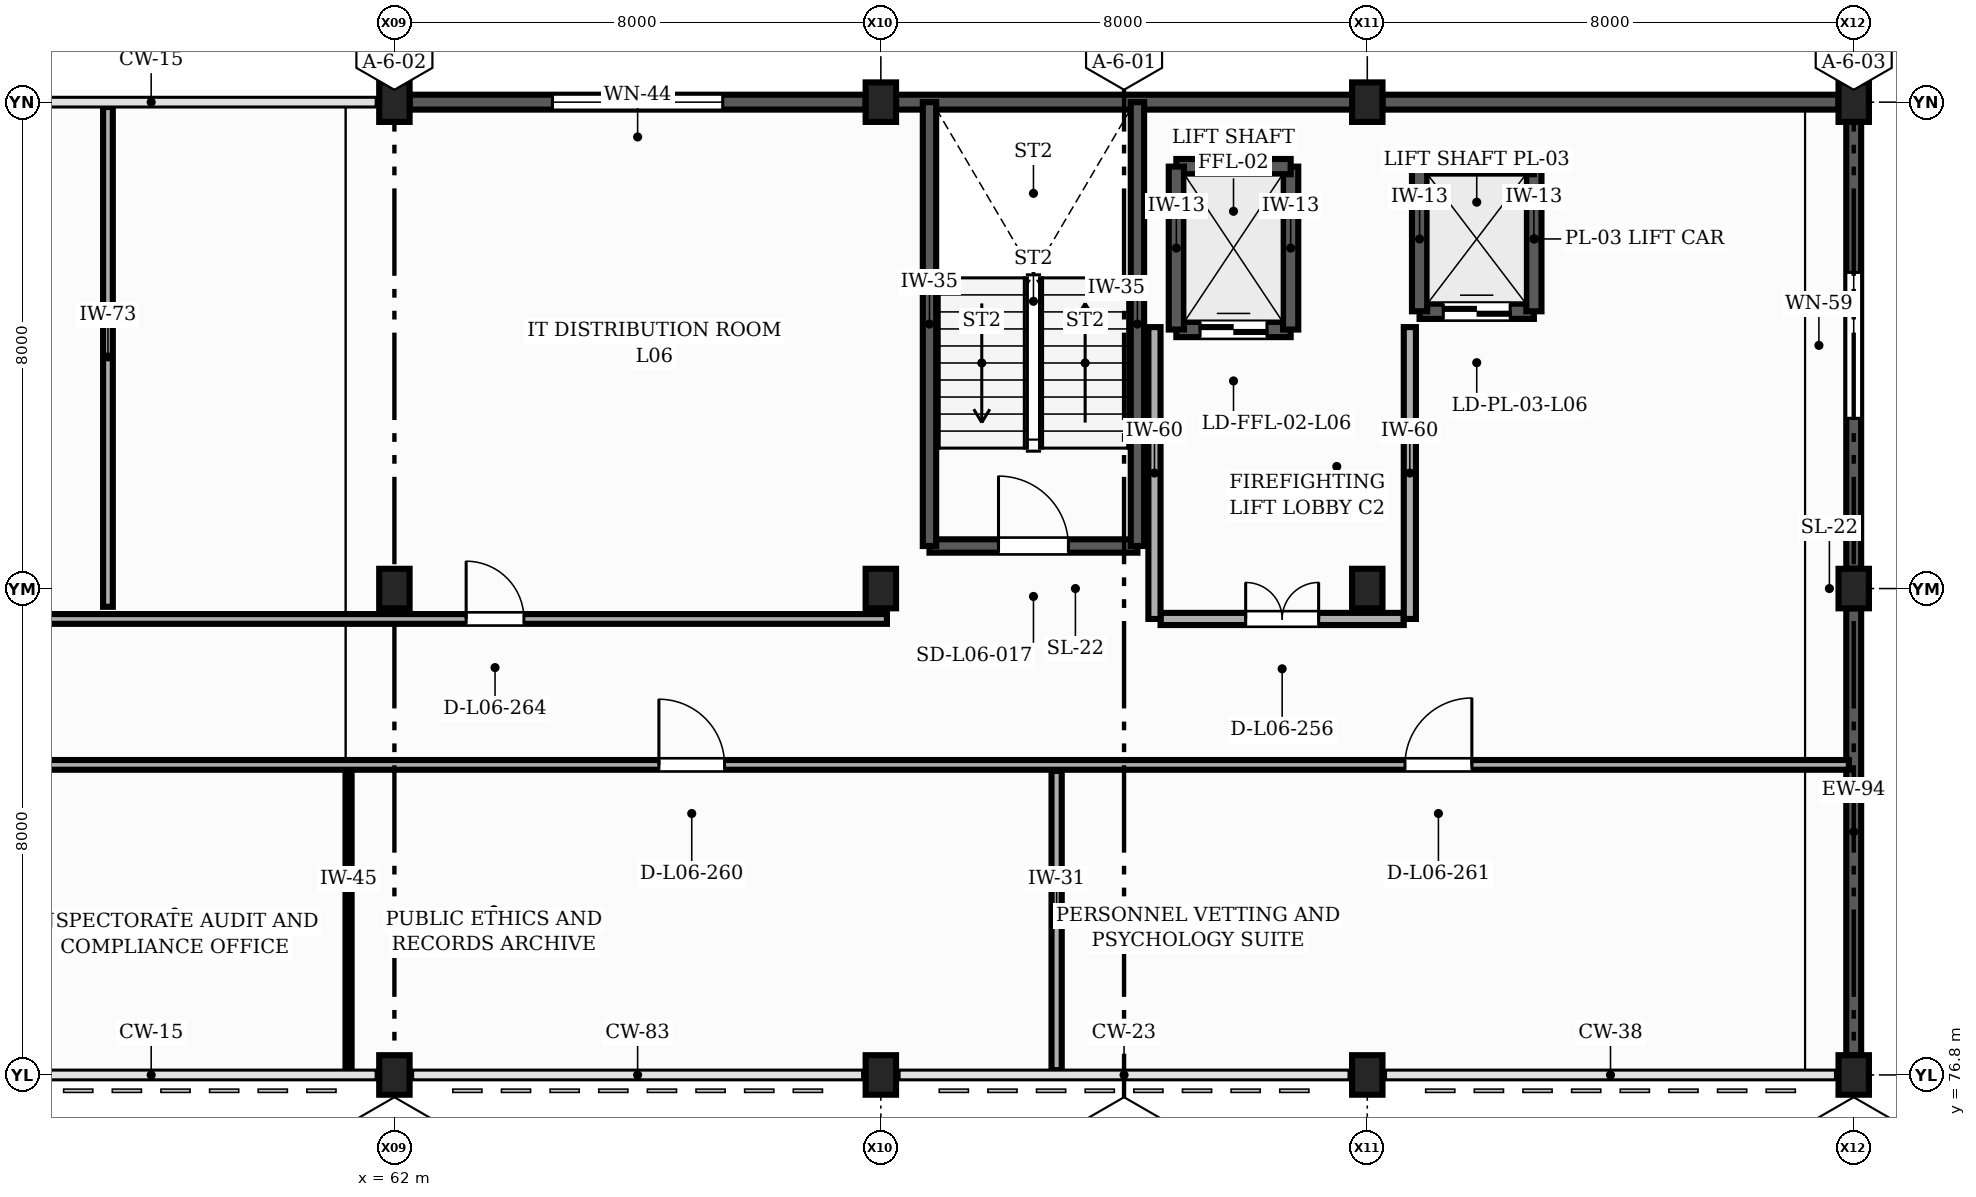
"""IFC4 building model, lengths in metres.
Left out: names, types, materials, properties, quantities, classifications, styles, units other than length and angle.
Written with IfcOpenShell. Run it as: python <this file> out.ifc"""

import sys

from ifc_helpers import new_model, si_unit, direction, frame, frame_2d, origin, origin_2d, place, context, subcontext, project, spatial, rectangle, extrude, element, fill, save


model = new_model("IFC4")
c1 = context("Model", 3, precision=1e-05, world=origin(), true_north=direction((0.0, 1.0)))
c2 = subcontext(c1, "Body", "Model", "MODEL_VIEW")
j1 = project(units=[si_unit("LENGTHUNIT", "METRE"), si_unit("PLANEANGLEUNIT", "RADIAN")], contexts=[c1])
p1 = place(None, origin())
s1 = spatial("IfcSite", under=j1, at=p1, CompositionType="ELEMENT")
p2 = place(p1, origin())
s2 = spatial("IfcBuilding", under=s1, at=p2, CompositionType="ELEMENT")
p3 = place(p2, frame((0.0, 0.0, 25.8)))
s3 = spatial("IfcBuildingStorey", under=s2, at=p3, CompositionType="ELEMENT", Elevation=25.8)
for number, where, z_axis, x_axis in (
    (1, (62.0, 76.8, 0.0), (0.0, 0.0, 1.0), (1.0, 0.0, 0.0)),
    (2, (62.0, 84.8, 0.0), (0.0, 0.0, 1.0), (1.0, 0.0, 0.0)),
    (3, (62.0, 92.8, 0.0), (0.0, 0.0, 1.0), (1.0, 0.0, 0.0)),
    (4, (70.0, 76.8, 0.0), (0.0, 0.0, 1.0), (1.0, 0.0, 0.0)),
    (5, (70.0, 84.8, 0.0), (0.0, 0.0, 1.0), (1.0, 0.0, 0.0)),
    (6, (70.0, 92.8, 0.0), (0.0, 0.0, 1.0), (1.0, 0.0, 0.0)),
    (7, (78.0, 76.8, 0.0), (0.0, 0.0, 1.0), (1.0, 0.0, 0.0)),
    (8, (78.0, 84.8, 0.0), (0.0, 0.0, 1.0), (1.0, 0.0, 0.0)),
    (9, (78.0, 92.8, 0.0), (0.0, 0.0, 1.0), (1.0, 0.0, 0.0)),
    (10, (86.0, 76.8, 0.0), (0.0, 0.0, 1.0), (1.0, 0.0, 0.0)),
    (11, (86.0, 84.8, 0.0), (0.0, 0.0, 1.0), (1.0, 0.0, 0.0)),
    (12, (86.0, 92.8, 0.0), (0.0, 0.0, 1.0), (1.0, 0.0, 0.0)),
):
    element("IfcColumn", number, at=place(p3, frame(where, z_axis=z_axis, x_axis=x_axis)), inside=s3, PredefinedType="COLUMN", context=c2, shape_type="SweptSolid", body=[
        extrude(rectangle(XDim=0.5, YDim=0.65, at=origin_2d()), origin(), (0.0, 0.0, 1.0), 3.9),
    ])
p4 = place(p3, frame((86.0, 77.125, 0.0), z_axis=(0.0, 0.0, 1.0), x_axis=(0.0, 1.0, 0.0)))
e13 = element("IfcWall", 13, at=p4, inside=s3, PredefinedType="SOLIDWALL", context=c2, shape_type="SweptSolid", body=[
    extrude(rectangle(XDim=7.35, YDim=0.245, at=frame_2d((3.675, 0.0))), origin(), (0.0, 0.0, 1.0), 3.01),
])
p5 = place(p3, frame((86.0, 85.125, 0.0), z_axis=(0.0, 0.0, 1.0), x_axis=(0.0, 1.0, 0.0)))
e14 = element("IfcWall", 14, at=p5, inside=s3, PredefinedType="SOLIDWALL", context=c2, shape_type="SweptSolid", body=[
    extrude(rectangle(XDim=7.35, YDim=0.245, at=frame_2d((3.675, 0.0))), origin(), (0.0, 0.0, 1.0), 3.01),
])
p6 = place(p5, frame((2.475, 0.0, 0.9)))
e15 = element("IfcOpeningElement", 15, at=p6, cuts=e14, PredefinedType="OPENING", context=c2, shape_type="SweptSolid", body=[
    extrude(rectangle(XDim=2.4, YDim=1.5, at=frame_2d((1.2, 0.75))), frame((0.0, 0.133, 0.0), z_axis=(0.0, -1.0, 0.0), x_axis=(1.0, 0.0, 0.0)), (0.0, 0.0, 1.0), 0.265),
])
p7 = place(p3, frame((85.75, 92.8, 0.0), z_axis=(0.0, 0.0, 1.0), x_axis=(-1.0, 0.0, 0.0)))
e16 = element("IfcWall", 16, at=p7, inside=s3, PredefinedType="SOLIDWALL", context=c2, shape_type="SweptSolid", body=[
    extrude(rectangle(XDim=7.5, YDim=0.245, at=frame_2d((3.75, 0.0))), origin(), (0.0, 0.0, 1.0), 3.01),
])
p8 = place(p3, frame((77.75, 92.8, 0.0), z_axis=(0.0, 0.0, 1.0), x_axis=(-1.0, 0.0, 0.0)))
e17 = element("IfcWall", 17, at=p8, inside=s3, PredefinedType="SOLIDWALL", context=c2, shape_type="SweptSolid", body=[
    extrude(rectangle(XDim=7.5, YDim=0.245, at=frame_2d((3.75, 0.0))), origin(), (0.0, 0.0, 1.0), 3.66),
])
p9 = place(p3, frame((69.75, 92.8, 0.0), z_axis=(0.0, 0.0, 1.0), x_axis=(-1.0, 0.0, 0.0)))
e18 = element("IfcWall", 18, at=p9, inside=s3, PredefinedType="SOLIDWALL", context=c2, shape_type="SweptSolid", body=[
    extrude(rectangle(XDim=7.5, YDim=0.245, at=frame_2d((3.75, 0.0))), origin(), (0.0, 0.0, 1.0), 3.01),
])
p10 = place(p9, frame((2.35, 0.0, 0.9)))
e19 = element("IfcOpeningElement", 19, at=p10, cuts=e18, PredefinedType="OPENING", context=c2, shape_type="SweptSolid", body=[
    extrude(rectangle(XDim=2.8, YDim=1.8, at=frame_2d((1.4, 0.9))), frame((0.0, 0.133, 0.0), z_axis=(0.0, -1.0, 0.0), x_axis=(1.0, 0.0, 0.0)), (0.0, 0.0, 1.0), 0.265),
])
p11 = place(p3, frame((70.8, 85.5, 0.0), z_axis=(0.0, 0.0, 1.0), x_axis=(1.0, 0.0, 0.0)))
e20 = element("IfcWall", 20, at=p11, inside=s3, PredefinedType="SHEAR", context=c2, shape_type="SweptSolid", body=[
    extrude(rectangle(XDim=3.42, YDim=0.22, at=frame_2d((1.71, 0.0))), origin(), (0.0, 0.0, 1.0), 3.9),
])
p12 = place(p11, frame((1.135, 0.0, 0.0)))
e21 = element("IfcOpeningElement", 21, at=p12, cuts=e20, PredefinedType="OPENING", context=c2, shape_type="SweptSolid", body=[
    extrude(rectangle(XDim=1.15, YDim=2.15, at=frame_2d((0.575, 1.075))), frame((0.0, 0.12, 0.0), z_axis=(0.0, -1.0, 0.0), x_axis=(1.0, 0.0, 0.0)), (0.0, 0.0, 1.0), 0.24),
])
for number, where, z_axis, x_axis in (
    (22, (74.22, 85.5, 0.0), (0.0, 0.0, 1.0), (0.0, 1.0, 0.0)),
    (23, (70.8, 92.8, 0.0), (0.0, 0.0, 1.0), (0.0, -1.0, 0.0)),
):
    element("IfcWall", number, at=place(p3, frame(where, z_axis=z_axis, x_axis=x_axis)), inside=s3, PredefinedType="SHEAR", context=c2, shape_type="SweptSolid", body=[
        extrude(rectangle(XDim=7.3, YDim=0.22, at=frame_2d((3.65, 0.0))), origin(), (0.0, 0.0, 1.0), 3.9),
    ])
p13 = place(p3, frame((74.86, 89.06, 0.0), z_axis=(0.0, 0.0, 1.0), x_axis=(1.0, 0.0, 0.0)))
e24 = element("IfcWall", 24, at=p13, inside=s3, PredefinedType="SHEAR", context=c2, shape_type="SweptSolid", body=[
    extrude(rectangle(XDim=1.88, YDim=0.25, at=frame_2d((0.94, 0.0))), origin(), (0.0, 0.0, 1.0), 3.9),
])
p14 = place(p13, frame((0.39, 0.0, 0.0)))
e25 = element("IfcOpeningElement", 25, at=p14, cuts=e24, PredefinedType="OPENING", context=c2, shape_type="SweptSolid", body=[
    extrude(rectangle(XDim=1.1, YDim=2.2, at=frame_2d((0.55, 1.1))), frame((0.0, 0.135, 0.0), z_axis=(0.0, -1.0, 0.0), x_axis=(1.0, 0.0, 0.0)), (0.0, 0.0, 1.0), 0.27),
])
p15 = place(p3, frame((76.74, 89.06, 0.0), z_axis=(0.0, 0.0, 1.0), x_axis=(0.0, 1.0, 0.0)))
e26 = element("IfcWall", 26, at=p15, inside=s3, PredefinedType="SHEAR", context=c2, shape_type="SweptSolid", body=[
    extrude(rectangle(XDim=2.68, YDim=0.25, at=frame_2d((1.34, 0.0))), origin(), (0.0, 0.0, 1.0), 3.9),
])
p16 = place(p3, frame((76.74, 91.74, 0.0), z_axis=(0.0, 0.0, 1.0), x_axis=(-1.0, 0.0, 0.0)))
e27 = element("IfcWall", 27, at=p16, inside=s3, PredefinedType="SHEAR", context=c2, shape_type="SweptSolid", body=[
    extrude(rectangle(XDim=1.88, YDim=0.25, at=frame_2d((0.94, 0.0))), origin(), (0.0, 0.0, 1.0), 3.9),
])
p17 = place(p3, frame((74.86, 91.74, 0.0), z_axis=(0.0, 0.0, 1.0), x_axis=(0.0, -1.0, 0.0)))
e28 = element("IfcWall", 28, at=p17, inside=s3, PredefinedType="SHEAR", context=c2, shape_type="SweptSolid", body=[
    extrude(rectangle(XDim=2.68, YDim=0.25, at=frame_2d((1.34, 0.0))), origin(), (0.0, 0.0, 1.0), 3.9),
])
p18 = place(p3, frame((78.86, 89.36, 0.0), z_axis=(0.0, 0.0, 1.0), x_axis=(1.0, 0.0, 0.0)))
e29 = element("IfcWall", 29, at=p18, inside=s3, PredefinedType="SHEAR", context=c2, shape_type="SweptSolid", body=[
    extrude(rectangle(XDim=1.88, YDim=0.25, at=frame_2d((0.94, 0.0))), origin(), (0.0, 0.0, 1.0), 3.9),
])
p19 = place(p18, frame((0.39, 0.0, 0.0)))
e30 = element("IfcOpeningElement", 30, at=p19, cuts=e29, PredefinedType="OPENING", context=c2, shape_type="SweptSolid", body=[
    extrude(rectangle(XDim=1.1, YDim=2.2, at=frame_2d((0.55, 1.1))), frame((0.0, 0.135, 0.0), z_axis=(0.0, -1.0, 0.0), x_axis=(1.0, 0.0, 0.0)), (0.0, 0.0, 1.0), 0.27),
])
p20 = place(p3, frame((80.74, 89.36, 0.0), z_axis=(0.0, 0.0, 1.0), x_axis=(0.0, 1.0, 0.0)))
e31 = element("IfcWall", 31, at=p20, inside=s3, PredefinedType="SHEAR", context=c2, shape_type="SweptSolid", body=[
    extrude(rectangle(XDim=2.38, YDim=0.25, at=frame_2d((1.19, 0.0))), origin(), (0.0, 0.0, 1.0), 3.9),
])
p21 = place(p3, frame((80.74, 91.74, 0.0), z_axis=(0.0, 0.0, 1.0), x_axis=(-1.0, 0.0, 0.0)))
e32 = element("IfcWall", 32, at=p21, inside=s3, PredefinedType="SHEAR", context=c2, shape_type="SweptSolid", body=[
    extrude(rectangle(XDim=1.88, YDim=0.25, at=frame_2d((0.94, 0.0))), origin(), (0.0, 0.0, 1.0), 3.9),
])
p22 = place(p3, frame((78.86, 91.74, 0.0), z_axis=(0.0, 0.0, 1.0), x_axis=(0.0, -1.0, 0.0)))
e33 = element("IfcWall", 33, at=p22, inside=s3, PredefinedType="SHEAR", context=c2, shape_type="SweptSolid", body=[
    extrude(rectangle(XDim=2.38, YDim=0.25, at=frame_2d((1.19, 0.0))), origin(), (0.0, 0.0, 1.0), 3.9),
])
p23 = place(p3, frame((74.6, 84.3, 0.0), z_axis=(0.0, 0.0, 1.0), x_axis=(1.0, 0.0, 0.0)))
e34 = element("IfcWall", 34, at=p23, inside=s3, PredefinedType="PARTITIONING", context=c2, shape_type="SweptSolid", body=[
    extrude(rectangle(XDim=4.0, YDim=0.2, at=frame_2d((2.0, 0.0))), origin(), (0.0, 0.0, 1.0), 2.895),
])
p24 = place(p23, frame((1.4, 0.0, 0.0)))
e35 = element("IfcOpeningElement", 35, at=p24, cuts=e34, PredefinedType="OPENING", context=c2, shape_type="SweptSolid", body=[
    extrude(rectangle(XDim=1.2, YDim=2.15, at=frame_2d((0.6, 1.075))), frame((0.0, 0.11, 0.0), z_axis=(0.0, -1.0, 0.0), x_axis=(1.0, 0.0, 0.0)), (0.0, 0.0, 1.0), 0.22),
])
p25 = place(p3, frame((74.5, 84.3, 0.0), z_axis=(0.0, 0.0, 1.0), x_axis=(0.0, 1.0, 0.0)))
e36 = element("IfcWall", 36, at=p25, inside=s3, PredefinedType="PARTITIONING", context=c2, shape_type="SweptSolid", body=[
    extrude(rectangle(XDim=4.8, YDim=0.2, at=frame_2d((2.4, 0.0))), origin(), (0.0, 0.0, 1.0), 3.045),
])
p26 = place(p3, frame((78.7, 84.3, 0.0), z_axis=(0.0, 0.0, 1.0), x_axis=(0.0, 1.0, 0.0)))
e37 = element("IfcWall", 37, at=p26, inside=s3, PredefinedType="PARTITIONING", context=c2, shape_type="SweptSolid", body=[
    extrude(rectangle(XDim=4.8, YDim=0.2, at=frame_2d((2.4, 0.0))), origin(), (0.0, 0.0, 1.0), 3.095),
])
p27 = place(p3, frame((61.246, 76.88, 0.0), z_axis=(0.0, 0.0, 1.0), x_axis=(0.0, 1.0, 0.0)))
e38 = element("IfcWall", 38, at=p27, inside=s3, PredefinedType="PARTITIONING", context=c2, shape_type="SweptSolid", body=[
    extrude(rectangle(XDim=4.92, YDim=0.1, at=frame_2d((2.46, 0.0))), origin(), (0.0, 0.0, 1.0), 3.66),
])
p28 = place(p3, frame((72.891, 76.88, 0.0), z_axis=(0.0, 0.0, 1.0), x_axis=(0.0, 1.0, 0.0)))
e39 = element("IfcWall", 39, at=p28, inside=s3, PredefinedType="PARTITIONING", context=c2, shape_type="SweptSolid", body=[
    extrude(rectangle(XDim=4.92, YDim=0.168, at=frame_2d((2.46, 0.0))), origin(), (0.0, 0.0, 1.0), 2.995),
])
p29 = place(p3, frame((13.28, 81.9, 0.0), z_axis=(0.0, 0.0, 1.0), x_axis=(1.0, 0.0, 0.0)))
e40 = element("IfcWall", 40, at=p29, inside=s3, PredefinedType="PARTITIONING", context=c2, shape_type="SweptSolid", body=[
    extrude(rectangle(XDim=72.64, YDim=0.16, at=frame_2d((36.32, 0.0))), origin(), (0.0, 0.0, 1.0), 2.895),
])
p30 = place(p29, frame((8.19, 0.0, 0.0)))
e41 = element("IfcOpeningElement", 41, at=p30, cuts=e40, PredefinedType="OPENING", context=c2, shape_type="SweptSolid", body=[
    extrude(rectangle(XDim=1.0, YDim=2.1, at=frame_2d((0.5, 1.05))), frame((0.0, 0.09, 0.0), z_axis=(0.0, -1.0, 0.0), x_axis=(1.0, 0.0, 0.0)), (0.0, 0.0, 1.0), 0.18),
])
p31 = place(p29, frame((24.54, 0.0, 0.0)))
e42 = element("IfcOpeningElement", 42, at=p31, cuts=e40, PredefinedType="OPENING", context=c2, shape_type="SweptSolid", body=[
    extrude(rectangle(XDim=1.02, YDim=2.12, at=frame_2d((0.51, 1.06))), frame((0.0, 0.09, 0.0), z_axis=(0.0, -1.0, 0.0), x_axis=(1.0, 0.0, 0.0)), (0.0, 0.0, 1.0), 0.18),
])
p32 = place(p29, frame((39.68, 0.0, 0.0)))
e43 = element("IfcOpeningElement", 43, at=p32, cuts=e40, PredefinedType="OPENING", context=c2, shape_type="SweptSolid", body=[
    extrude(rectangle(XDim=1.05, YDim=2.1, at=frame_2d((0.525, 1.05))), frame((0.0, 0.09, 0.0), z_axis=(0.0, -1.0, 0.0), x_axis=(1.0, 0.0, 0.0)), (0.0, 0.0, 1.0), 0.18),
])
p33 = place(p29, frame((53.07, 0.0, 0.0)))
e44 = element("IfcOpeningElement", 44, at=p33, cuts=e40, PredefinedType="OPENING", context=c2, shape_type="SweptSolid", body=[
    extrude(rectangle(XDim=1.08, YDim=2.14, at=frame_2d((0.54, 1.07))), frame((0.0, 0.09, 0.0), z_axis=(0.0, -1.0, 0.0), x_axis=(1.0, 0.0, 0.0)), (0.0, 0.0, 1.0), 0.18),
])
p34 = place(p29, frame((65.34, 0.0, 0.0)))
e45 = element("IfcOpeningElement", 45, at=p34, cuts=e40, PredefinedType="OPENING", context=c2, shape_type="SweptSolid", body=[
    extrude(rectangle(XDim=1.1, YDim=2.1, at=frame_2d((0.55, 1.05))), frame((0.0, 0.09, 0.0), z_axis=(0.0, -1.0, 0.0), x_axis=(1.0, 0.0, 0.0)), (0.0, 0.0, 1.0), 0.18),
])
p35 = place(p3, frame((57.289, 84.5, 0.0), z_axis=(0.0, 0.0, 1.0), x_axis=(0.0, 1.0, 0.0)))
e46 = element("IfcWall", 46, at=p35, inside=s3, PredefinedType="PARTITIONING", context=c2, shape_type="SweptSolid", body=[
    extrude(rectangle(XDim=8.22, YDim=0.16, at=frame_2d((4.11, 0.0))), origin(), (0.0, 0.0, 1.0), 2.945),
])
p36 = place(p3, frame((34.7, 84.3, 0.0), z_axis=(0.0, 0.0, 1.0), x_axis=(1.0, 0.0, 0.0)))
e47 = element("IfcWall", 47, at=p36, inside=s3, PredefinedType="PARTITIONING", context=c2, shape_type="SweptSolid", body=[
    extrude(rectangle(XDim=35.4, YDim=0.16, at=frame_2d((17.7, 0.0))), origin(), (0.0, 0.0, 1.0), 2.895),
])
p37 = place(p36, frame((5.92, 0.0, 0.0)))
e48 = element("IfcOpeningElement", 48, at=p37, cuts=e47, PredefinedType="OPENING", context=c2, shape_type="SweptSolid", body=[
    extrude(rectangle(XDim=0.9, YDim=2.1, at=frame_2d((0.45, 1.05))), frame((0.0, 0.09, 0.0), z_axis=(0.0, -1.0, 0.0), x_axis=(1.0, 0.0, 0.0)), (0.0, 0.0, 1.0), 0.18),
])
p38 = place(p36, frame((17.2, 0.0, 0.0)))
e49 = element("IfcOpeningElement", 49, at=p38, cuts=e47, PredefinedType="OPENING", context=c2, shape_type="SweptSolid", body=[
    extrude(rectangle(XDim=0.95, YDim=2.15, at=frame_2d((0.475, 1.075))), frame((0.0, 0.09, 0.0), z_axis=(0.0, -1.0, 0.0), x_axis=(1.0, 0.0, 0.0)), (0.0, 0.0, 1.0), 0.18),
])
p39 = place(p36, frame((28.48, 0.0, 0.0)))
e50 = element("IfcOpeningElement", 50, at=p39, cuts=e47, PredefinedType="OPENING", context=c2, shape_type="SweptSolid", body=[
    extrude(rectangle(XDim=0.95, YDim=2.1, at=frame_2d((0.475, 1.05))), frame((0.0, 0.09, 0.0), z_axis=(0.0, -1.0, 0.0), x_axis=(1.0, 0.0, 0.0)), (0.0, 0.0, 1.0), 0.18),
])
p40 = place(p6, origin())
e51 = element("IfcWindow", 51, at=p40, inside=s3, PartitioningType="SINGLE_PANEL", PredefinedType="WINDOW", context=c2, shape_type="SweptSolid", body=[
    extrude(rectangle(XDim=2.4, YDim=1.5, at=frame_2d((1.2, 0.75))), frame((0.0, 0.03, 0.0), z_axis=(0.0, -1.0, 0.0), x_axis=(1.0, 0.0, 0.0)), (0.0, 0.0, 1.0), 0.06),
])
fill(e15, e51)
p41 = place(p10, origin())
e52 = element("IfcWindow", 52, at=p41, inside=s3, PartitioningType="SINGLE_PANEL", PredefinedType="WINDOW", context=c2, shape_type="SweptSolid", body=[
    extrude(rectangle(XDim=2.8, YDim=1.8, at=frame_2d((1.4, 0.9))), frame((0.0, 0.03, 0.0), z_axis=(0.0, -1.0, 0.0), x_axis=(1.0, 0.0, 0.0)), (0.0, 0.0, 1.0), 0.06),
])
fill(e19, e52)
p42 = place(p12, origin())
e53 = element("IfcDoor", 53, at=p42, inside=s3, OperationType="SINGLE_SWING_LEFT", PredefinedType="DOOR", context=c2, shape_type="SweptSolid", body=[
    extrude(rectangle(XDim=1.15, YDim=2.15, at=frame_2d((0.575, 1.075))), frame((0.0, 0.025, 0.0), z_axis=(0.0, -1.0, 0.0), x_axis=(1.0, 0.0, 0.0)), (0.0, 0.0, 1.0), 0.05),
])
fill(e21, e53)
p43 = place(p14, origin())
e54 = element("IfcDoor", 54, at=p43, inside=s3, OperationType="DOUBLE_DOOR_SLIDING", PredefinedType="DOOR", context=c2, shape_type="SweptSolid", body=[
    extrude(rectangle(XDim=1.1, YDim=2.2, at=frame_2d((0.55, 1.1))), frame((0.0, 0.025, 0.0), z_axis=(0.0, -1.0, 0.0), x_axis=(1.0, 0.0, 0.0)), (0.0, 0.0, 1.0), 0.05),
])
fill(e25, e54)
p44 = place(p19, origin())
e55 = element("IfcDoor", 55, at=p44, inside=s3, OperationType="DOUBLE_DOOR_SLIDING", PredefinedType="DOOR", context=c2, shape_type="SweptSolid", body=[
    extrude(rectangle(XDim=1.1, YDim=2.2, at=frame_2d((0.55, 1.1))), frame((0.0, 0.025, 0.0), z_axis=(0.0, -1.0, 0.0), x_axis=(1.0, 0.0, 0.0)), (0.0, 0.0, 1.0), 0.05),
])
fill(e30, e55)
p45 = place(p24, origin())
e56 = element("IfcDoor", 56, at=p45, inside=s3, OperationType="DOUBLE_DOOR_SINGLE_SWING", PredefinedType="DOOR", context=c2, shape_type="SweptSolid", body=[
    extrude(rectangle(XDim=1.2, YDim=2.15, at=frame_2d((0.6, 1.075))), frame((0.0, 0.025, 0.0), z_axis=(0.0, -1.0, 0.0), x_axis=(1.0, 0.0, 0.0)), (0.0, 0.0, 1.0), 0.05),
])
fill(e35, e56)
p46 = place(p33, origin())
e57 = element("IfcDoor", 57, at=p46, inside=s3, OperationType="SINGLE_SWING_LEFT", PredefinedType="DOOR", context=c2, shape_type="SweptSolid", body=[
    extrude(rectangle(XDim=1.08, YDim=2.14, at=frame_2d((0.54, 1.07))), frame((0.0, 0.025, 0.0), z_axis=(0.0, -1.0, 0.0), x_axis=(1.0, 0.0, 0.0)), (0.0, 0.0, 1.0), 0.05),
])
fill(e44, e57)
p47 = place(p34, origin())
e58 = element("IfcDoor", 58, at=p47, inside=s3, OperationType="SINGLE_SWING_RIGHT", PredefinedType="DOOR", context=c2, shape_type="SweptSolid", body=[
    extrude(rectangle(XDim=1.1, YDim=2.1, at=frame_2d((0.55, 1.05))), frame((0.0, 0.025, 0.0), z_axis=(0.0, -1.0, 0.0), x_axis=(1.0, 0.0, 0.0)), (0.0, 0.0, 1.0), 0.05),
])
fill(e45, e58)
p48 = place(p39, origin())
e59 = element("IfcDoor", 59, at=p48, inside=s3, OperationType="SINGLE_SWING_LEFT", PredefinedType="DOOR", context=c2, shape_type="SweptSolid", body=[
    extrude(rectangle(XDim=0.95, YDim=2.1, at=frame_2d((0.475, 1.05))), frame((0.0, 0.025, 0.0), z_axis=(0.0, -1.0, 0.0), x_axis=(1.0, 0.0, 0.0)), (0.0, 0.0, 1.0), 0.05),
])
fill(e50, e59)
save(model, sys.argv[1])
